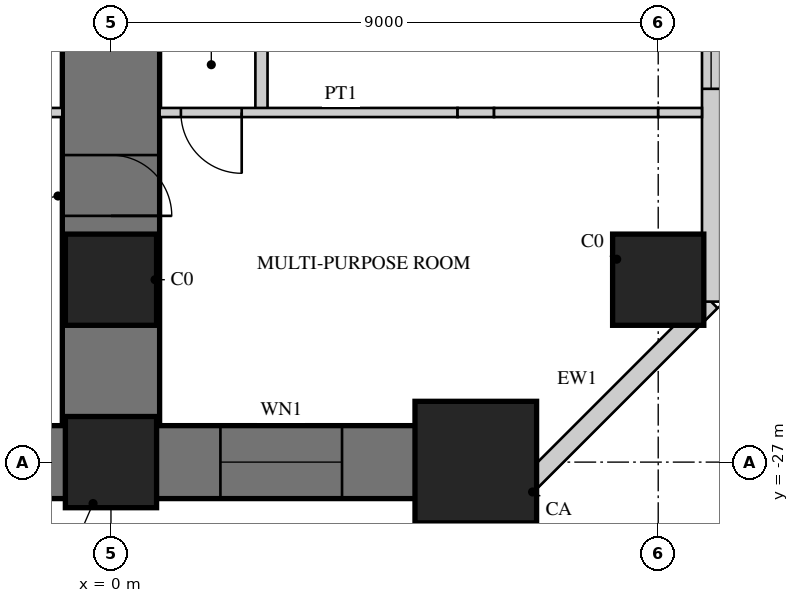
"""IFC4 building model, lengths in metres.
Left out: names, types, materials, properties, quantities, classifications, styles, units other than length and angle.
Written with IfcOpenShell. Run it as: python <this file> out.ifc"""

import sys

from ifc_helpers import new_model, si_unit, direction, frame, frame_2d, origin, origin_2d, place, context, subcontext, project, spatial, rectangle, hollow_rectangle, extrude, element, fill, save


model = new_model("IFC4")
c1 = context("Model", 3, precision=1e-05, world=origin(), true_north=direction((0.0, 1.0)))
c2 = subcontext(c1, "Body", "Model", "MODEL_VIEW")
j1 = project(units=[si_unit("LENGTHUNIT", "METRE"), si_unit("PLANEANGLEUNIT", "RADIAN")], contexts=[c1])
p1 = place(None, origin())
s1 = spatial("IfcSite", under=j1, at=p1, CompositionType="ELEMENT")
p2 = place(p1, origin())
s2 = spatial("IfcBuilding", under=s1, at=p2, CompositionType="ELEMENT")
p3 = place(p2, frame((0.0, 0.0, 5.0)))
s3 = spatial("IfcBuildingStorey", under=s2, at=p3, CompositionType="ELEMENT", Elevation=5.0)
p4 = place(p3, frame((0.0, -9.0, 0.0), z_axis=(0.0, 0.0, 1.0), x_axis=(0.0, -1.0, 0.0)))
e1 = element("IfcWall", 1, at=p4, inside=s3, PredefinedType="SHEAR", context=c2, shape_type="SweptSolid", body=[
    extrude(rectangle(XDim=18.0, YDim=1.6, at=frame_2d((9.0, 0.0))), origin(), (0.0, 0.0, 1.0), 4.5),
])
p5 = place(p4, frame((1.85, 0.0, 0.0)))
e2 = element("IfcOpeningElement", 2, at=p5, cuts=e1, PredefinedType="OPENING", context=c2, shape_type="SweptSolid", body=[
    extrude(rectangle(XDim=1.0, YDim=2.2, at=frame_2d((0.5, 1.1))), frame((0.0, 0.81, 0.0), z_axis=(0.0, -1.0, 0.0), x_axis=(1.0, 0.0, 0.0)), (0.0, 0.0, 1.0), 1.62),
])
p6 = place(p4, frame((7.2, 0.0, 0.0)))
e3 = element("IfcOpeningElement", 3, at=p6, cuts=e1, PredefinedType="OPENING", context=c2, shape_type="SweptSolid", body=[
    extrude(rectangle(XDim=1.0, YDim=2.2, at=frame_2d((0.5, 1.1))), frame((0.0, 0.81, 0.0), z_axis=(0.0, -1.0, 0.0), x_axis=(1.0, 0.0, 0.0)), (0.0, 0.0, 1.0), 1.62),
])
p7 = place(p4, frame((12.95, 0.0, 0.0)))
e4 = element("IfcOpeningElement", 4, at=p7, cuts=e1, PredefinedType="OPENING", context=c2, shape_type="SweptSolid", body=[
    extrude(rectangle(XDim=1.0, YDim=2.2, at=frame_2d((0.5, 1.1))), frame((0.0, 0.81, 0.0), z_axis=(0.0, -1.0, 0.0), x_axis=(1.0, 0.0, 0.0)), (0.0, 0.0, 1.0), 1.62),
])
p8 = place(p3, frame((-6.0, -27.0, 0.0), z_axis=(0.0, 0.0, 1.0), x_axis=(1.0, 0.0, 0.0)))
e5 = element("IfcWall", 5, at=p8, inside=s3, PredefinedType="SHEAR", context=c2, shape_type="SweptSolid", body=[
    extrude(rectangle(XDim=12.0, YDim=1.2, at=frame_2d((6.0, 0.0))), origin(), (0.0, 0.0, 1.0), 4.5),
])
p9 = place(p8, frame((2.2, 0.0, 0.9)))
e6 = element("IfcOpeningElement", 6, at=p9, cuts=e5, PredefinedType="OPENING", context=c2, shape_type="SweptSolid", body=[
    extrude(rectangle(XDim=2.0, YDim=1.8, at=frame_2d((1.0, 0.9))), frame((0.0, 0.61, 0.0), z_axis=(0.0, -1.0, 0.0), x_axis=(1.0, 0.0, 0.0)), (0.0, 0.0, 1.0), 1.22),
])
p10 = place(p8, frame((7.8, 0.0, 0.9)))
e7 = element("IfcOpeningElement", 7, at=p10, cuts=e5, PredefinedType="OPENING", context=c2, shape_type="SweptSolid", body=[
    extrude(rectangle(XDim=2.0, YDim=1.8, at=frame_2d((1.0, 0.9))), frame((0.0, 0.61, 0.0), z_axis=(0.0, -1.0, 0.0), x_axis=(1.0, 0.0, 0.0)), (0.0, 0.0, 1.0), 1.22),
])
for number, where, z_axis, x_axis in (
    (8, (9.0, -24.0, 0.0), (0.0, 0.0, 1.0), (1.0, 0.0, 0.0)),
    (9, (0.0, -27.0, 0.0), (0.0, 0.0, 1.0), (1.0, 0.0, 0.0)),
):
    element("IfcColumn", number, at=place(p3, frame(where, z_axis=z_axis, x_axis=x_axis)), inside=s3, PredefinedType="COLUMN", context=c2, shape_type="SweptSolid", body=[
        extrude(rectangle(XDim=1.5, YDim=1.5, at=origin_2d()), origin(), (0.0, 0.0, 1.0), 4.5),
    ])
p11 = place(p3, frame((6.0, -27.0, 0.0), z_axis=(0.0, 0.0, 1.0), x_axis=(1.0, 0.0, 0.0)))
e10 = element("IfcColumn", 10, at=p11, inside=s3, PredefinedType="COLUMN", context=c2, shape_type="SweptSolid", body=[
    extrude(rectangle(XDim=2.0, YDim=2.0, at=origin_2d()), origin(), (0.0, 0.0, 1.0), 4.5),
])
p12 = place(p3, frame((0.0, -24.0, 0.0), z_axis=(0.0, 0.0, 1.0), x_axis=(1.0, 0.0, 0.0)))
e11 = element("IfcColumn", 11, at=p12, inside=s3, PredefinedType="COLUMN", context=c2, shape_type="SweptSolid", body=[
    extrude(rectangle(XDim=1.5, YDim=1.5, at=origin_2d()), origin(), (0.0, 0.0, 1.0), 4.5),
])
p13 = place(p3, frame((6.63, -27.6, 0.0), z_axis=(0.0, 0.0, 1.0), x_axis=(0.707106781187, 0.707106781187, 0.0)))
e12 = element("IfcWall", 12, at=p13, inside=s3, PredefinedType="SOLIDWALL", context=c2, shape_type="SweptSolid", body=[
    extrude(rectangle(XDim=4.582, YDim=0.3, at=frame_2d((2.291, 0.0))), origin(), (0.0, 0.0, 1.0), 4.3),
])
p14 = place(p3, frame((9.87, -24.36, 0.0), z_axis=(0.0, 0.0, 1.0), x_axis=(0.0, 1.0, 0.0)))
e13 = element("IfcWall", 13, at=p14, inside=s3, PredefinedType="SOLIDWALL", context=c2, shape_type="SweptSolid", body=[
    extrude(rectangle(XDim=6.0, YDim=0.3, at=frame_2d((3.0, 0.0))), origin(), (0.0, 0.0, 1.0), 4.3),
])
p15 = place(p14, frame((3.5, 0.0, 0.9)))
e14 = element("IfcOpeningElement", 14, at=p15, cuts=e13, PredefinedType="OPENING", context=c2, shape_type="SweptSolid", body=[
    extrude(rectangle(XDim=2.0, YDim=1.8, at=frame_2d((1.0, 0.9))), frame((0.0, 0.16, 0.0), z_axis=(0.0, -1.0, 0.0), x_axis=(1.0, 0.0, 0.0)), (0.0, 0.0, 1.0), 0.32),
])
p16 = place(p3, frame((2.475, -9.65, 0.0), z_axis=(0.0, 0.0, 1.0), x_axis=(0.0, -1.0, 0.0)))
e15 = element("IfcWall", 15, at=p16, inside=s3, PredefinedType="SOLIDWALL", context=c2, shape_type="SweptSolid", body=[
    extrude(rectangle(XDim=11.6, YDim=0.2, at=frame_2d((5.8, 0.0))), origin(), (0.0, 0.0, 1.0), 4.3),
])
p17 = place(p16, frame((1.2, 0.0, 0.0)))
e16 = element("IfcOpeningElement", 16, at=p17, cuts=e15, PredefinedType="OPENING", context=c2, shape_type="SweptSolid", body=[
    extrude(rectangle(XDim=1.0, YDim=2.2, at=frame_2d((0.5, 1.1))), frame((0.0, 0.11, 0.0), z_axis=(0.0, -1.0, 0.0), x_axis=(1.0, 0.0, 0.0)), (0.0, 0.0, 1.0), 0.22),
])
p18 = place(p16, frame((3.6, 0.0, 0.0)))
e17 = element("IfcOpeningElement", 17, at=p18, cuts=e15, PredefinedType="OPENING", context=c2, shape_type="SweptSolid", body=[
    extrude(rectangle(XDim=1.0, YDim=2.2, at=frame_2d((0.5, 1.1))), frame((0.0, 0.11, 0.0), z_axis=(0.0, -1.0, 0.0), x_axis=(1.0, 0.0, 0.0)), (0.0, 0.0, 1.0), 0.22),
])
p19 = place(p16, frame((6.55, 0.0, 0.0)))
e18 = element("IfcOpeningElement", 18, at=p19, cuts=e15, PredefinedType="OPENING", context=c2, shape_type="SweptSolid", body=[
    extrude(rectangle(XDim=1.0, YDim=2.2, at=frame_2d((0.5, 1.1))), frame((0.0, 0.11, 0.0), z_axis=(0.0, -1.0, 0.0), x_axis=(1.0, 0.0, 0.0)), (0.0, 0.0, 1.0), 0.22),
])
p20 = place(p3, frame((-5.7, -21.25, 0.0), z_axis=(0.0, 0.0, 1.0), x_axis=(1.0, 0.0, 0.0)))
e19 = element("IfcWall", 19, at=p20, inside=s3, PredefinedType="PARTITIONING", context=c2, shape_type="SweptSolid", body=[
    extrude(rectangle(XDim=4.9, YDim=0.15, at=frame_2d((2.45, 0.0))), origin(), (0.0, 0.0, 1.0), 3.35),
])
p21 = place(p3, frame((0.8, -21.25, 0.0), z_axis=(0.0, 0.0, 1.0), x_axis=(1.0, 0.0, 0.0)))
e20 = element("IfcWall", 20, at=p21, inside=s3, PredefinedType="PARTITIONING", context=c2, shape_type="SweptSolid", body=[
    extrude(rectangle(XDim=4.9, YDim=0.15, at=frame_2d((2.45, 0.0))), origin(), (0.0, 0.0, 1.0), 3.35),
])
p22 = place(p21, frame((0.35, 0.0, 0.0)))
e21 = element("IfcOpeningElement", 21, at=p22, cuts=e20, PredefinedType="OPENING", context=c2, shape_type="SweptSolid", body=[
    extrude(rectangle(XDim=1.0, YDim=2.2, at=frame_2d((0.5, 1.1))), frame((0.0, 0.085, 0.0), z_axis=(0.0, -1.0, 0.0), x_axis=(1.0, 0.0, 0.0)), (0.0, 0.0, 1.0), 0.17),
])
p23 = place(p3, frame((5.7, -21.25, 0.0), z_axis=(0.0, 0.0, 1.0), x_axis=(1.0, 0.0, 0.0)))
e22 = element("IfcWall", 22, at=p23, inside=s3, PredefinedType="PARTITIONING", context=c2, shape_type="SweptSolid", body=[
    extrude(rectangle(XDim=0.6, YDim=0.15, at=frame_2d((0.3, 0.0))), origin(), (0.0, 0.0, 1.0), 4.3),
])
p24 = place(p3, frame((6.3, -21.25, 0.0), z_axis=(0.0, 0.0, 1.0), x_axis=(1.0, 0.0, 0.0)))
e23 = element("IfcWall", 23, at=p24, inside=s3, PredefinedType="PARTITIONING", context=c2, shape_type="SweptSolid", body=[
    extrude(rectangle(XDim=2.7, YDim=0.15, at=frame_2d((1.35, 0.0))), origin(), (0.0, 0.0, 1.0), 3.35),
])
p25 = place(p3, frame((9.0, -21.25, 0.0), z_axis=(0.0, 0.0, 1.0), x_axis=(1.0, 0.0, 0.0)))
e24 = element("IfcWall", 24, at=p25, inside=s3, PredefinedType="PARTITIONING", context=c2, shape_type="SweptSolid", body=[
    extrude(rectangle(XDim=0.72, YDim=0.15, at=frame_2d((0.36, 0.0))), origin(), (0.0, 0.0, 1.0), 4.3),
])
p26 = place(p10, origin())
e25 = element("IfcWindow", 25, at=p26, inside=s3, PartitioningType="SINGLE_PANEL", PredefinedType="WINDOW", context=c2, shape_type="SweptSolid", body=[
    extrude(hollow_rectangle(XDim=2.0, YDim=1.8, WallThickness=0.06, at=frame_2d((1.0, 0.9))), frame((0.0, 0.03, 0.0), z_axis=(0.0, -1.0, 0.0), x_axis=(1.0, 0.0, 0.0)), (0.0, 0.0, 1.0), 0.06),
    extrude(rectangle(XDim=1.879, YDim=1.679, at=frame_2d((1.0, 0.9))), frame((0.0, 0.03, 0.0), z_axis=(0.0, -1.0, 0.0), x_axis=(1.0, 0.0, 0.0)), (0.0, 0.0, 1.0), 0.06),
])
fill(e7, e25)
p27 = place(p15, origin())
e26 = element("IfcWindow", 26, at=p27, inside=s3, PartitioningType="SINGLE_PANEL", PredefinedType="WINDOW", context=c2, shape_type="SweptSolid", body=[
    extrude(hollow_rectangle(XDim=2.0, YDim=1.8, WallThickness=0.06, at=frame_2d((1.0, 0.9))), frame((0.0, 0.03, 0.0), z_axis=(0.0, -1.0, 0.0), x_axis=(1.0, 0.0, 0.0)), (0.0, 0.0, 1.0), 0.06),
    extrude(rectangle(XDim=1.879, YDim=1.679, at=frame_2d((1.0, 0.9))), frame((0.0, 0.03, 0.0), z_axis=(0.0, -1.0, 0.0), x_axis=(1.0, 0.0, 0.0)), (0.0, 0.0, 1.0), 0.06),
])
fill(e14, e26)
p28 = place(p22, frame((1.0, 0.0, 0.0), z_axis=(0.0, 0.0, 1.0), x_axis=(-1.0, 0.0, 0.0)))
e27 = element("IfcDoor", 27, at=p28, inside=s3, OperationType="SINGLE_SWING_LEFT", PredefinedType="DOOR", context=c2, shape_type="SweptSolid", body=[
    extrude(rectangle(XDim=1.0, YDim=2.2, at=frame_2d((0.5, 1.1))), frame((0.0, 0.025, 0.0), z_axis=(0.0, -1.0, 0.0), x_axis=(1.0, 0.0, 0.0)), (0.0, 0.0, 1.0), 0.05),
])
fill(e21, e27)
p29 = place(p7, origin())
e28 = element("IfcDoor", 28, at=p29, inside=s3, OperationType="SINGLE_SWING_RIGHT", PredefinedType="DOOR", context=c2, shape_type="SweptSolid", body=[
    extrude(rectangle(XDim=1.0, YDim=2.2, at=frame_2d((0.5, 1.1))), frame((0.0, 0.025, 0.0), z_axis=(0.0, -1.0, 0.0), x_axis=(1.0, 0.0, 0.0)), (0.0, 0.0, 1.0), 0.05),
])
fill(e4, e28)
save(model, sys.argv[1])
